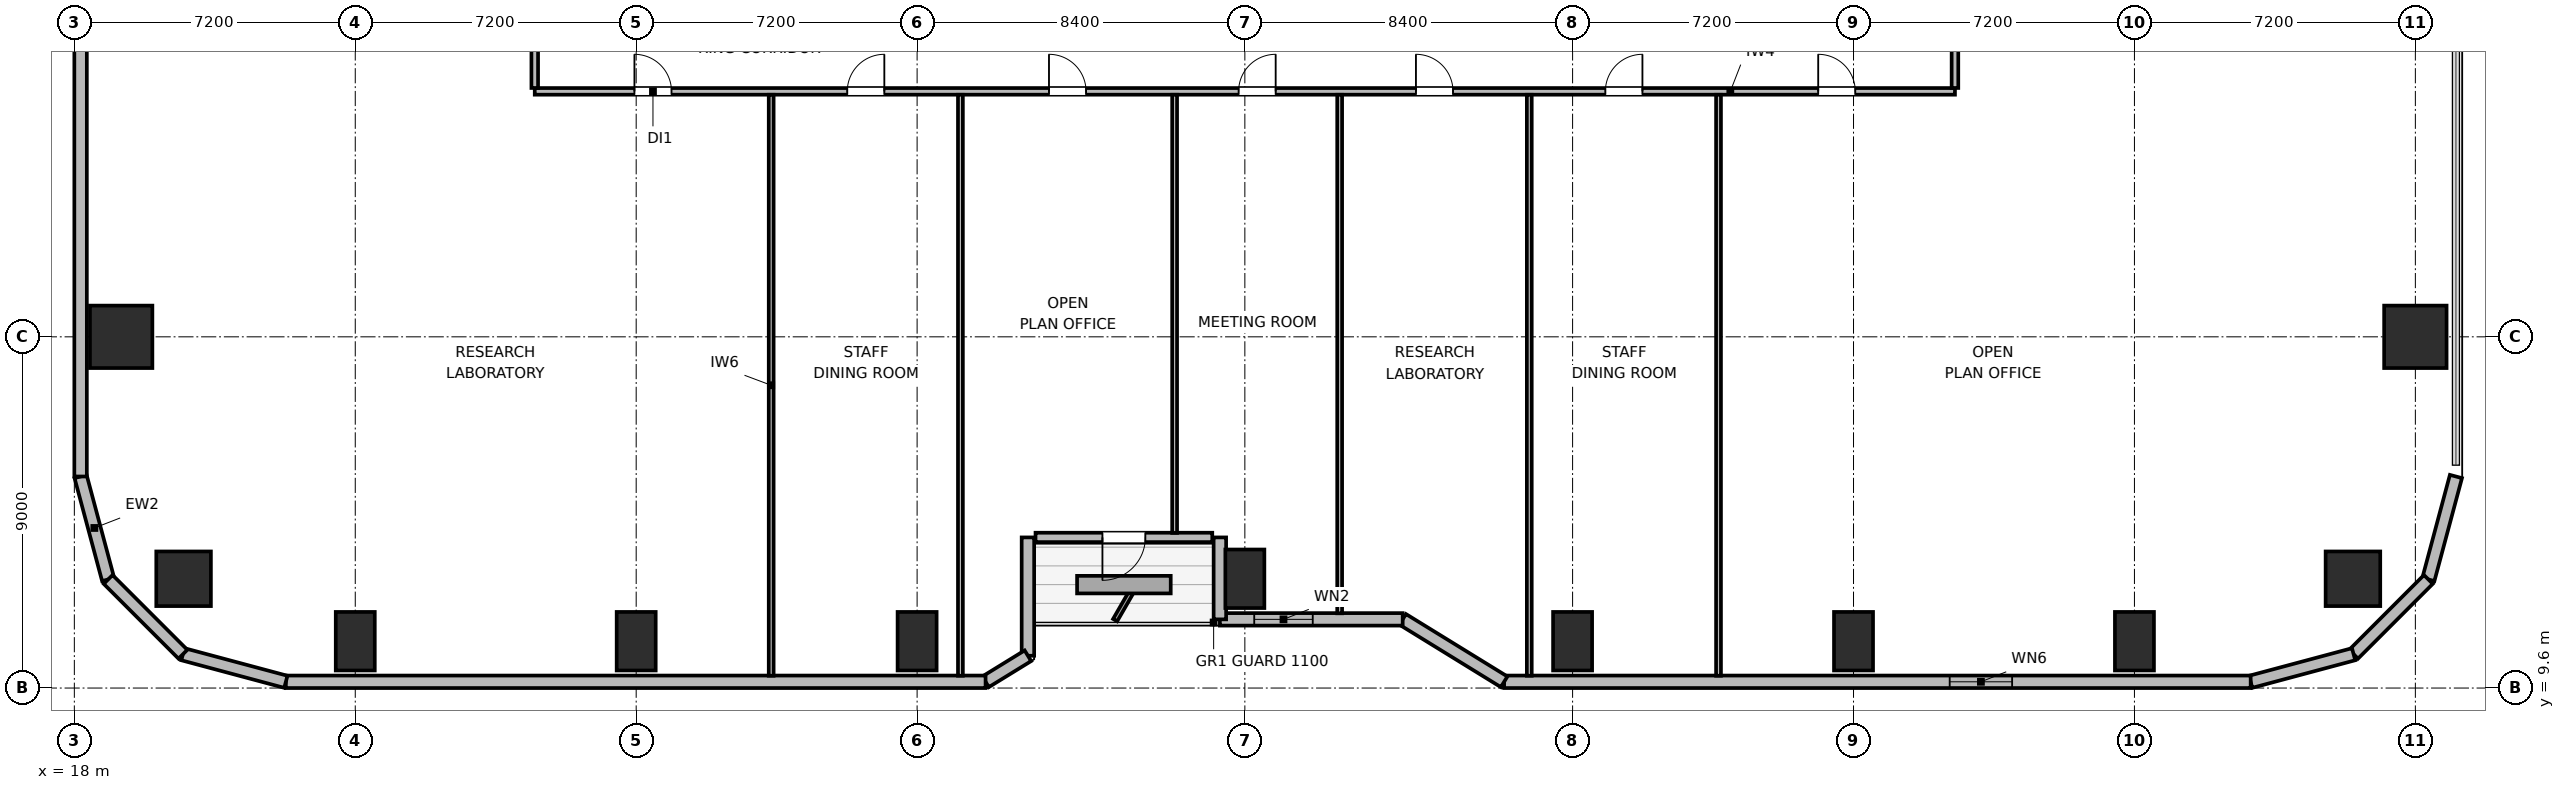
"""IFC4 building model, lengths in metres.
Left out: names, types, materials, properties, quantities, classifications, styles, units other than length and angle.
Written with IfcOpenShell. Run it as: python <this file> out.ifc"""

import sys

from ifc_helpers import new_model, si_unit, direction, frame, frame_2d, origin, origin_2d, place, context, subcontext, project, spatial, rectangle, circle, extrude, element, fill, save


model = new_model("IFC4")
c1 = context("Model", 3, precision=1e-05, world=origin(), true_north=direction((0.0, 1.0)))
c2 = subcontext(c1, "Body", "Model", "MODEL_VIEW")
j1 = project(units=[si_unit("LENGTHUNIT", "METRE"), si_unit("PLANEANGLEUNIT", "RADIAN")], contexts=[c1])
p1 = place(None, origin())
s1 = spatial("IfcSite", under=j1, at=p1, CompositionType="ELEMENT")
p2 = place(p1, origin())
s2 = spatial("IfcBuilding", under=s1, at=p2, CompositionType="ELEMENT")
p3 = place(p2, frame((0.0, 0.0, 52.8)))
s3 = spatial("IfcBuildingStorey", under=s2, at=p3, CompositionType="ELEMENT", Elevation=52.8)
for number, where, z_axis, x_axis in (
    (1, (20.8, 12.4, 0.0), (0.0, 0.0, 1.0), (1.0, 0.0, 0.0)),
    (2, (76.4, 12.4, 0.0), (0.0, 0.0, 1.0), (1.0, 0.0, 0.0)),
):
    element("IfcColumn", number, at=place(p3, frame(where, z_axis=z_axis, x_axis=x_axis)), inside=s3, PredefinedType="COLUMN", context=c2, shape_type="SweptSolid", body=[
        extrude(circle(Radius=0.7, at=origin_2d()), origin(), (0.0, 0.0, 1.0), 3.9),
    ])
for number, where, z_axis, x_axis in (
    (3, (25.2, 10.8, 0.0), (0.0, 0.0, 1.0), (1.0, 0.0, 0.0)),
    (4, (32.4, 10.8, 0.0), (0.0, 0.0, 1.0), (1.0, 0.0, 0.0)),
    (5, (39.6, 10.8, 0.0), (0.0, 0.0, 1.0), (1.0, 0.0, 0.0)),
    (6, (48.0, 12.4, 0.0), (0.0, 0.0, 1.0), (1.0, 0.0, 0.0)),
    (7, (56.4, 10.8, 0.0), (0.0, 0.0, 1.0), (1.0, 0.0, 0.0)),
    (8, (63.6, 10.8, 0.0), (0.0, 0.0, 1.0), (1.0, 0.0, 0.0)),
    (9, (70.8, 10.8, 0.0), (0.0, 0.0, 1.0), (1.0, 0.0, 0.0)),
):
    element("IfcColumn", number, at=place(p3, frame(where, z_axis=z_axis, x_axis=x_axis)), inside=s3, PredefinedType="COLUMN", context=c2, shape_type="SweptSolid", body=[
        extrude(rectangle(XDim=1.0, YDim=1.5, at=origin_2d()), origin(), (0.0, 0.0, 1.0), 3.9),
    ])
for number, where, z_axis, x_axis in (
    (10, (19.2, 18.6, 0.0), (0.0, 0.0, 1.0), (1.0, 0.0, 0.0)),
    (11, (78.0, 18.6, 0.0), (0.0, 0.0, 1.0), (1.0, 0.0, 0.0)),
):
    element("IfcColumn", number, at=place(p3, frame(where, z_axis=z_axis, x_axis=x_axis)), inside=s3, PredefinedType="COLUMN", context=c2, shape_type="SweptSolid", body=[
        extrude(rectangle(XDim=1.6, YDim=1.6, at=origin_2d()), origin(), (0.0, 0.0, 1.0), 3.9),
    ])
p4 = place(p3, frame((18.866, 12.383, 0.0), z_axis=(0.0, 0.0, 1.0), x_axis=(-0.25869736047, 0.965958423373, 0.0)))
e12 = element("IfcWall", 12, at=p4, inside=s3, PredefinedType="SOLIDWALL", context=c2, shape_type="SweptSolid", body=[
    extrude(rectangle(XDim=2.731, YDim=0.32, at=frame_2d((1.366, 0.0))), origin(), (0.0, 0.0, 1.0), 3.64),
])
p5 = place(p3, frame((18.16, 15.021, 0.0), z_axis=(0.0, 0.0, 1.0), x_axis=(0.0, 1.0, 0.0)))
e13 = element("IfcWall", 13, at=p5, inside=s3, PredefinedType="SOLIDWALL", context=c2, shape_type="SweptSolid", body=[
    extrude(rectangle(XDim=14.219, YDim=0.32, at=frame_2d((7.109, 0.0))), origin(), (0.0, 0.0, 1.0), 3.64),
])
p6 = place(p3, frame((79.04, 15.021, 0.0), z_axis=(0.0, 0.0, 1.0), x_axis=(-0.25869736047, -0.965958423373, 0.0)))
e14 = element("IfcWall", 14, at=p6, inside=s3, PredefinedType="SOLIDWALL", context=c2, shape_type="SweptSolid", body=[
    extrude(rectangle(XDim=2.731, YDim=0.32, at=frame_2d((1.366, 0.0))), origin(), (0.0, 0.0, 1.0), 3.64),
])
p7 = place(p3, frame((78.333, 12.383, 0.0), z_axis=(0.0, 0.0, 1.0), x_axis=(-0.707106781187, -0.707106781187, 0.0)))
e15 = element("IfcWall", 15, at=p7, inside=s3, PredefinedType="SOLIDWALL", context=c2, shape_type="SweptSolid", body=[
    extrude(rectangle(XDim=2.71, YDim=0.32, at=frame_2d((1.355, 0.0))), origin(), (0.0, 0.0, 1.0), 3.64),
])
p8 = place(p3, frame((76.417, 10.467, 0.0), z_axis=(0.0, 0.0, 1.0), x_axis=(-0.965964405026, -0.25867502435, 0.0)))
e16 = element("IfcWall", 16, at=p8, inside=s3, PredefinedType="SOLIDWALL", context=c2, shape_type="SweptSolid", body=[
    extrude(rectangle(XDim=2.731, YDim=0.32, at=frame_2d((1.366, 0.0))), origin(), (0.0, 0.0, 1.0), 3.64),
])
p9 = place(p3, frame((73.779, 9.76, 0.0), z_axis=(0.0, 0.0, 1.0), x_axis=(-1.0, 0.0, 0.0)))
e17 = element("IfcWall", 17, at=p9, inside=s3, PredefinedType="SOLIDWALL", context=c2, shape_type="SweptSolid", body=[
    extrude(rectangle(XDim=19.134, YDim=0.32, at=frame_2d((9.567, 0.0))), origin(), (0.0, 0.0, 1.0), 3.64),
])
p10 = place(p9, frame((6.114, 0.0, 0.85)))
e18 = element("IfcOpeningElement", 18, at=p10, cuts=e17, PredefinedType="OPENING", context=c2, shape_type="SweptSolid", body=[
    extrude(rectangle(XDim=1.6, YDim=1.0, at=frame_2d((0.8, 0.5))), frame((0.0, 0.17, 0.0), z_axis=(0.0, -1.0, 0.0), x_axis=(1.0, 0.0, 0.0)), (0.0, 0.0, 1.0), 0.34),
])
p11 = place(p3, frame((54.645, 9.76, 0.0), z_axis=(0.0, 0.0, 1.0), x_axis=(-0.851630857047, 0.524142044989, 0.0)))
e19 = element("IfcWall", 19, at=p11, inside=s3, PredefinedType="SOLIDWALL", context=c2, shape_type="SweptSolid", body=[
    extrude(rectangle(XDim=3.053, YDim=0.32, at=frame_2d((1.526, 0.0))), origin(), (0.0, 0.0, 1.0), 2.875),
])
p12 = place(p3, frame((52.045, 11.36, 0.0), z_axis=(0.0, 0.0, 1.0), x_axis=(-1.0, 0.0, 0.0)))
e20 = element("IfcWall", 20, at=p12, inside=s3, PredefinedType="SOLIDWALL", context=c2, shape_type="SweptSolid", body=[
    extrude(rectangle(XDim=4.685, YDim=0.32, at=frame_2d((2.343, 0.0))), origin(), (0.0, 0.0, 1.0), 2.875),
])
p13 = place(p12, frame((2.305, 0.0, 0.85)))
e21 = element("IfcOpeningElement", 21, at=p13, cuts=e20, PredefinedType="OPENING", context=c2, shape_type="SweptSolid", body=[
    extrude(rectangle(XDim=1.5, YDim=1.1, at=frame_2d((0.75, 0.55))), frame((0.0, 0.17, 0.0), z_axis=(0.0, -1.0, 0.0), x_axis=(1.0, 0.0, 0.0)), (0.0, 0.0, 1.0), 0.34),
])
p14 = place(p3, frame((47.36, 11.36, 0.0), z_axis=(0.0, 0.0, 1.0), x_axis=(0.0, 1.0, 0.0)))
e22 = element("IfcWall", 22, at=p14, inside=s3, PredefinedType="SOLIDWALL", context=c2, shape_type="SweptSolid", body=[
    extrude(rectangle(XDim=2.1, YDim=0.32, at=frame_2d((1.05, 0.0))), origin(), (0.0, 0.0, 1.0), 2.875),
])
p15 = place(p3, frame((47.165, 13.46, 0.0), z_axis=(0.0, 0.0, 1.0), x_axis=(-1.0, 0.0, 0.0)))
e23 = element("IfcWall", 23, at=p15, inside=s3, PredefinedType="SOLIDWALL", context=c2, shape_type="SweptSolid", body=[
    extrude(rectangle(XDim=4.53, YDim=0.24, at=frame_2d((2.265, 0.0))), origin(), (0.0, 0.0, 1.0), 3.64),
])
p16 = place(p15, frame((1.715, 0.0, 0.0)))
e24 = element("IfcOpeningElement", 24, at=p16, cuts=e23, PredefinedType="OPENING", context=c2, shape_type="SweptSolid", body=[
    extrude(rectangle(XDim=1.1, YDim=2.04, at=frame_2d((0.55, 1.02))), frame((0.0, 0.13, 0.0), z_axis=(0.0, -1.0, 0.0), x_axis=(1.0, 0.0, 0.0)), (0.0, 0.0, 1.0), 0.26),
])
p17 = place(p3, frame((42.44, 13.46, 0.0), z_axis=(0.0, 0.0, 1.0), x_axis=(0.0, -1.0, 0.0)))
e25 = element("IfcWall", 25, at=p17, inside=s3, PredefinedType="SOLIDWALL", context=c2, shape_type="SweptSolid", body=[
    extrude(rectangle(XDim=3.032, YDim=0.32, at=frame_2d((1.516, 0.0))), origin(), (0.0, 0.0, 1.0), 2.875),
])
p18 = place(p3, frame((42.44, 10.427, 0.0), z_axis=(0.0, 0.0, 1.0), x_axis=(-0.851776724646, -0.523904964045, 0.0)))
e26 = element("IfcWall", 26, at=p18, inside=s3, PredefinedType="SOLIDWALL", context=c2, shape_type="SweptSolid", body=[
    extrude(rectangle(XDim=1.274, YDim=0.32, at=frame_2d((0.637, 0.0))), origin(), (0.0, 0.0, 1.0), 3.64),
])
p19 = place(p3, frame((41.355, 9.76, 0.0), z_axis=(0.0, 0.0, 1.0), x_axis=(-1.0, 0.0, 0.0)))
e27 = element("IfcWall", 27, at=p19, inside=s3, PredefinedType="SOLIDWALL", context=c2, shape_type="SweptSolid", body=[
    extrude(rectangle(XDim=17.934, YDim=0.32, at=frame_2d((8.967, 0.0))), origin(), (0.0, 0.0, 1.0), 3.64),
])
p20 = place(p3, frame((23.421, 9.76, 0.0), z_axis=(0.0, 0.0, 1.0), x_axis=(-0.965964405026, 0.25867502435, 0.0)))
e28 = element("IfcWall", 28, at=p20, inside=s3, PredefinedType="SOLIDWALL", context=c2, shape_type="SweptSolid", body=[
    extrude(rectangle(XDim=2.731, YDim=0.32, at=frame_2d((1.366, 0.0))), origin(), (0.0, 0.0, 1.0), 3.64),
])
p21 = place(p3, frame((20.783, 10.467, 0.0), z_axis=(0.0, 0.0, 1.0), x_axis=(-0.707106781187, 0.707106781187, 0.0)))
e29 = element("IfcWall", 29, at=p21, inside=s3, PredefinedType="SOLIDWALL", context=c2, shape_type="SweptSolid", body=[
    extrude(rectangle(XDim=2.71, YDim=0.32, at=frame_2d((1.355, 0.0))), origin(), (0.0, 0.0, 1.0), 3.64),
])
p22 = place(p3, frame((29.8, 24.89, 0.0), z_axis=(0.0, 0.0, 1.0), x_axis=(1.0, 0.0, 0.0)))
e30 = element("IfcWall", 30, at=p22, inside=s3, PredefinedType="PARTITIONING", context=c2, shape_type="SweptSolid", body=[
    extrude(rectangle(XDim=36.4, YDim=0.17, at=frame_2d((18.2, 0.0))), origin(), (0.0, 0.0, 1.0), 3.64),
])
p23 = place(p22, frame((2.555, 0.0, 0.0)))
e31 = element("IfcOpeningElement", 31, at=p23, cuts=e30, PredefinedType="OPENING", context=c2, shape_type="SweptSolid", body=[
    extrude(rectangle(XDim=0.95, YDim=2.04, at=frame_2d((0.475, 1.02))), frame((0.0, 0.095, 0.0), z_axis=(0.0, -1.0, 0.0), x_axis=(1.0, 0.0, 0.0)), (0.0, 0.0, 1.0), 0.19),
])
p24 = place(p22, frame((8.01, 0.0, 0.0)))
e32 = element("IfcOpeningElement", 32, at=p24, cuts=e30, PredefinedType="OPENING", context=c2, shape_type="SweptSolid", body=[
    extrude(rectangle(XDim=0.95, YDim=2.04, at=frame_2d((0.475, 1.02))), frame((0.0, 0.095, 0.0), z_axis=(0.0, -1.0, 0.0), x_axis=(1.0, 0.0, 0.0)), (0.0, 0.0, 1.0), 0.19),
])
p25 = place(p22, frame((13.18, 0.0, 0.0)))
e33 = element("IfcOpeningElement", 33, at=p25, cuts=e30, PredefinedType="OPENING", context=c2, shape_type="SweptSolid", body=[
    extrude(rectangle(XDim=0.95, YDim=2.04, at=frame_2d((0.475, 1.02))), frame((0.0, 0.095, 0.0), z_axis=(0.0, -1.0, 0.0), x_axis=(1.0, 0.0, 0.0)), (0.0, 0.0, 1.0), 0.19),
])
p26 = place(p22, frame((18.04, 0.0, 0.0)))
e34 = element("IfcOpeningElement", 34, at=p26, cuts=e30, PredefinedType="OPENING", context=c2, shape_type="SweptSolid", body=[
    extrude(rectangle(XDim=0.95, YDim=2.04, at=frame_2d((0.475, 1.02))), frame((0.0, 0.095, 0.0), z_axis=(0.0, -1.0, 0.0), x_axis=(1.0, 0.0, 0.0)), (0.0, 0.0, 1.0), 0.19),
])
p27 = place(p22, frame((22.585, 0.0, 0.0)))
e35 = element("IfcOpeningElement", 35, at=p27, cuts=e30, PredefinedType="OPENING", context=c2, shape_type="SweptSolid", body=[
    extrude(rectangle(XDim=0.95, YDim=2.04, at=frame_2d((0.475, 1.02))), frame((0.0, 0.095, 0.0), z_axis=(0.0, -1.0, 0.0), x_axis=(1.0, 0.0, 0.0)), (0.0, 0.0, 1.0), 0.19),
])
p28 = place(p22, frame((27.44, 0.0, 0.0)))
e36 = element("IfcOpeningElement", 36, at=p28, cuts=e30, PredefinedType="OPENING", context=c2, shape_type="SweptSolid", body=[
    extrude(rectangle(XDim=0.95, YDim=2.04, at=frame_2d((0.475, 1.02))), frame((0.0, 0.095, 0.0), z_axis=(0.0, -1.0, 0.0), x_axis=(1.0, 0.0, 0.0)), (0.0, 0.0, 1.0), 0.19),
])
p29 = place(p22, frame((32.895, 0.0, 0.0)))
e37 = element("IfcOpeningElement", 37, at=p29, cuts=e30, PredefinedType="OPENING", context=c2, shape_type="SweptSolid", body=[
    extrude(rectangle(XDim=0.95, YDim=2.04, at=frame_2d((0.475, 1.02))), frame((0.0, 0.095, 0.0), z_axis=(0.0, -1.0, 0.0), x_axis=(1.0, 0.0, 0.0)), (0.0, 0.0, 1.0), 0.19),
])
p30 = place(p3, frame((29.8, 24.977, 0.0), z_axis=(0.0, 0.0, 1.0), x_axis=(0.0, 1.0, 0.0)))
e38 = element("IfcWall", 38, at=p30, inside=s3, PredefinedType="PARTITIONING", context=c2, shape_type="SweptSolid", body=[
    extrude(rectangle(XDim=22.046, YDim=0.17, at=frame_2d((11.023, 0.0))), origin(), (0.0, 0.0, 1.0), 3.64),
])
p31 = place(p30, frame((10.548, 0.0, 0.0)))
e39 = element("IfcOpeningElement", 39, at=p31, cuts=e38, PredefinedType="OPENING", context=c2, shape_type="SweptSolid", body=[
    extrude(rectangle(XDim=0.95, YDim=2.04, at=frame_2d((0.475, 1.02))), frame((0.0, 0.095, 0.0), z_axis=(0.0, -1.0, 0.0), x_axis=(1.0, 0.0, 0.0)), (0.0, 0.0, 1.0), 0.19),
])
p32 = place(p3, frame((66.2, 24.977, 0.0), z_axis=(0.0, 0.0, 1.0), x_axis=(0.0, 1.0, 0.0)))
e40 = element("IfcWall", 40, at=p32, inside=s3, PredefinedType="PARTITIONING", context=c2, shape_type="SweptSolid", body=[
    extrude(rectangle(XDim=22.046, YDim=0.17, at=frame_2d((11.023, 0.0))), origin(), (0.0, 0.0, 1.0), 3.64),
])
p33 = place(p32, frame((4.493, 0.0, 0.0)))
e41 = element("IfcOpeningElement", 41, at=p33, cuts=e40, PredefinedType="OPENING", context=c2, shape_type="SweptSolid", body=[
    extrude(rectangle(XDim=0.95, YDim=2.04, at=frame_2d((0.475, 1.02))), frame((0.0, 0.095, 0.0), z_axis=(0.0, -1.0, 0.0), x_axis=(1.0, 0.0, 0.0)), (0.0, 0.0, 1.0), 0.19),
])
p34 = place(p32, frame((15.603, 0.0, 0.0)))
e42 = element("IfcOpeningElement", 42, at=p34, cuts=e40, PredefinedType="OPENING", context=c2, shape_type="SweptSolid", body=[
    extrude(rectangle(XDim=0.95, YDim=2.04, at=frame_2d((0.475, 1.02))), frame((0.0, 0.095, 0.0), z_axis=(0.0, -1.0, 0.0), x_axis=(1.0, 0.0, 0.0)), (0.0, 0.0, 1.0), 0.19),
])
p35 = place(p3, frame((35.86, 9.915, 0.0), z_axis=(0.0, 0.0, 1.0), x_axis=(0.0, 1.0, 0.0)))
e43 = element("IfcWall", 43, at=p35, inside=s3, PredefinedType="PARTITIONING", context=c2, shape_type="SweptSolid", body=[
    extrude(rectangle(XDim=14.888, YDim=0.125, at=frame_2d((7.444, 0.0))), origin(), (0.0, 0.0, 1.0), 3.64),
])
p36 = place(p3, frame((40.71, 9.915, 0.0), z_axis=(0.0, 0.0, 1.0), x_axis=(0.0, 1.0, 0.0)))
e44 = element("IfcWall", 44, at=p36, inside=s3, PredefinedType="PARTITIONING", context=c2, shape_type="SweptSolid", body=[
    extrude(rectangle(XDim=14.888, YDim=0.125, at=frame_2d((7.444, 0.0))), origin(), (0.0, 0.0, 1.0), 3.003),
])
p37 = place(p3, frame((46.2, 13.575, 0.0), z_axis=(0.0, 0.0, 1.0), x_axis=(0.0, 1.0, 0.0)))
e45 = element("IfcWall", 45, at=p37, inside=s3, PredefinedType="PARTITIONING", context=c2, shape_type="SweptSolid", body=[
    extrude(rectangle(XDim=11.228, YDim=0.125, at=frame_2d((5.614, 0.0))), origin(), (0.0, 0.0, 1.0), 3.64),
])
p38 = place(p3, frame((50.43, 11.515, 0.0), z_axis=(0.0, 0.0, 1.0), x_axis=(0.0, 1.0, 0.0)))
e46 = element("IfcWall", 46, at=p38, inside=s3, PredefinedType="PARTITIONING", context=c2, shape_type="SweptSolid", body=[
    extrude(rectangle(XDim=13.288, YDim=0.125, at=frame_2d((6.644, 0.0))), origin(), (0.0, 0.0, 1.0), 3.64),
])
p39 = place(p3, frame((55.29, 9.915, 0.0), z_axis=(0.0, 0.0, 1.0), x_axis=(0.0, 1.0, 0.0)))
e47 = element("IfcWall", 47, at=p39, inside=s3, PredefinedType="PARTITIONING", context=c2, shape_type="SweptSolid", body=[
    extrude(rectangle(XDim=14.888, YDim=0.125, at=frame_2d((7.444, 0.0))), origin(), (0.0, 0.0, 1.0), 3.003),
])
p40 = place(p3, frame((60.14, 9.915, 0.0), z_axis=(0.0, 0.0, 1.0), x_axis=(0.0, 1.0, 0.0)))
e48 = element("IfcWall", 48, at=p40, inside=s3, PredefinedType="PARTITIONING", context=c2, shape_type="SweptSolid", body=[
    extrude(rectangle(XDim=14.888, YDim=0.125, at=frame_2d((7.444, 0.0))), origin(), (0.0, 0.0, 1.0), 3.64),
])
p41 = place(p10, origin())
e49 = element("IfcWindow", 49, at=p41, inside=s3, PartitioningType="SINGLE_PANEL", PredefinedType="WINDOW", context=c2, shape_type="SweptSolid", body=[
    extrude(rectangle(XDim=1.6, YDim=1.0, at=frame_2d((0.8, 0.5))), frame((0.0, 0.03, 0.0), z_axis=(0.0, -1.0, 0.0), x_axis=(1.0, 0.0, 0.0)), (0.0, 0.0, 1.0), 0.06),
])
fill(e18, e49)
p42 = place(p13, origin())
e50 = element("IfcWindow", 50, at=p42, inside=s3, PartitioningType="SINGLE_PANEL", PredefinedType="WINDOW", context=c2, shape_type="SweptSolid", body=[
    extrude(rectangle(XDim=1.5, YDim=1.1, at=frame_2d((0.75, 0.55))), frame((0.0, 0.03, 0.0), z_axis=(0.0, -1.0, 0.0), x_axis=(1.0, 0.0, 0.0)), (0.0, 0.0, 1.0), 0.06),
])
fill(e21, e50)
p43 = place(p16, origin())
e51 = element("IfcDoor", 51, at=p43, inside=s3, OperationType="SINGLE_SWING_RIGHT", PredefinedType="DOOR", context=c2, shape_type="SweptSolid", body=[
    extrude(rectangle(XDim=1.1, YDim=2.04, at=frame_2d((0.55, 1.02))), frame((0.0, 0.025, 0.0), z_axis=(0.0, -1.0, 0.0), x_axis=(1.0, 0.0, 0.0)), (0.0, 0.0, 1.0), 0.05),
])
fill(e24, e51)
p44 = place(p23, origin())
e52 = element("IfcDoor", 52, at=p44, inside=s3, OperationType="SINGLE_SWING_LEFT", PredefinedType="DOOR", context=c2, shape_type="SweptSolid", body=[
    extrude(rectangle(XDim=0.95, YDim=2.04, at=frame_2d((0.475, 1.02))), frame((0.0, 0.025, 0.0), z_axis=(0.0, -1.0, 0.0), x_axis=(1.0, 0.0, 0.0)), (0.0, 0.0, 1.0), 0.05),
])
fill(e31, e52)
p45 = place(p24, origin())
e53 = element("IfcDoor", 53, at=p45, inside=s3, OperationType="SINGLE_SWING_RIGHT", PredefinedType="DOOR", context=c2, shape_type="SweptSolid", body=[
    extrude(rectangle(XDim=0.95, YDim=2.04, at=frame_2d((0.475, 1.02))), frame((0.0, 0.025, 0.0), z_axis=(0.0, -1.0, 0.0), x_axis=(1.0, 0.0, 0.0)), (0.0, 0.0, 1.0), 0.05),
])
fill(e32, e53)
p46 = place(p25, origin())
e54 = element("IfcDoor", 54, at=p46, inside=s3, OperationType="SINGLE_SWING_LEFT", PredefinedType="DOOR", context=c2, shape_type="SweptSolid", body=[
    extrude(rectangle(XDim=0.95, YDim=2.04, at=frame_2d((0.475, 1.02))), frame((0.0, 0.025, 0.0), z_axis=(0.0, -1.0, 0.0), x_axis=(1.0, 0.0, 0.0)), (0.0, 0.0, 1.0), 0.05),
])
fill(e33, e54)
p47 = place(p26, origin())
e55 = element("IfcDoor", 55, at=p47, inside=s3, OperationType="SINGLE_SWING_RIGHT", PredefinedType="DOOR", context=c2, shape_type="SweptSolid", body=[
    extrude(rectangle(XDim=0.95, YDim=2.04, at=frame_2d((0.475, 1.02))), frame((0.0, 0.025, 0.0), z_axis=(0.0, -1.0, 0.0), x_axis=(1.0, 0.0, 0.0)), (0.0, 0.0, 1.0), 0.05),
])
fill(e34, e55)
p48 = place(p27, origin())
e56 = element("IfcDoor", 56, at=p48, inside=s3, OperationType="SINGLE_SWING_LEFT", PredefinedType="DOOR", context=c2, shape_type="SweptSolid", body=[
    extrude(rectangle(XDim=0.95, YDim=2.04, at=frame_2d((0.475, 1.02))), frame((0.0, 0.025, 0.0), z_axis=(0.0, -1.0, 0.0), x_axis=(1.0, 0.0, 0.0)), (0.0, 0.0, 1.0), 0.05),
])
fill(e35, e56)
p49 = place(p28, origin())
e57 = element("IfcDoor", 57, at=p49, inside=s3, OperationType="SINGLE_SWING_RIGHT", PredefinedType="DOOR", context=c2, shape_type="SweptSolid", body=[
    extrude(rectangle(XDim=0.95, YDim=2.04, at=frame_2d((0.475, 1.02))), frame((0.0, 0.025, 0.0), z_axis=(0.0, -1.0, 0.0), x_axis=(1.0, 0.0, 0.0)), (0.0, 0.0, 1.0), 0.05),
])
fill(e36, e57)
p50 = place(p29, origin())
e58 = element("IfcDoor", 58, at=p50, inside=s3, OperationType="SINGLE_SWING_LEFT", PredefinedType="DOOR", context=c2, shape_type="SweptSolid", body=[
    extrude(rectangle(XDim=0.95, YDim=2.04, at=frame_2d((0.475, 1.02))), frame((0.0, 0.025, 0.0), z_axis=(0.0, -1.0, 0.0), x_axis=(1.0, 0.0, 0.0)), (0.0, 0.0, 1.0), 0.05),
])
fill(e37, e58)
save(model, sys.argv[1])
